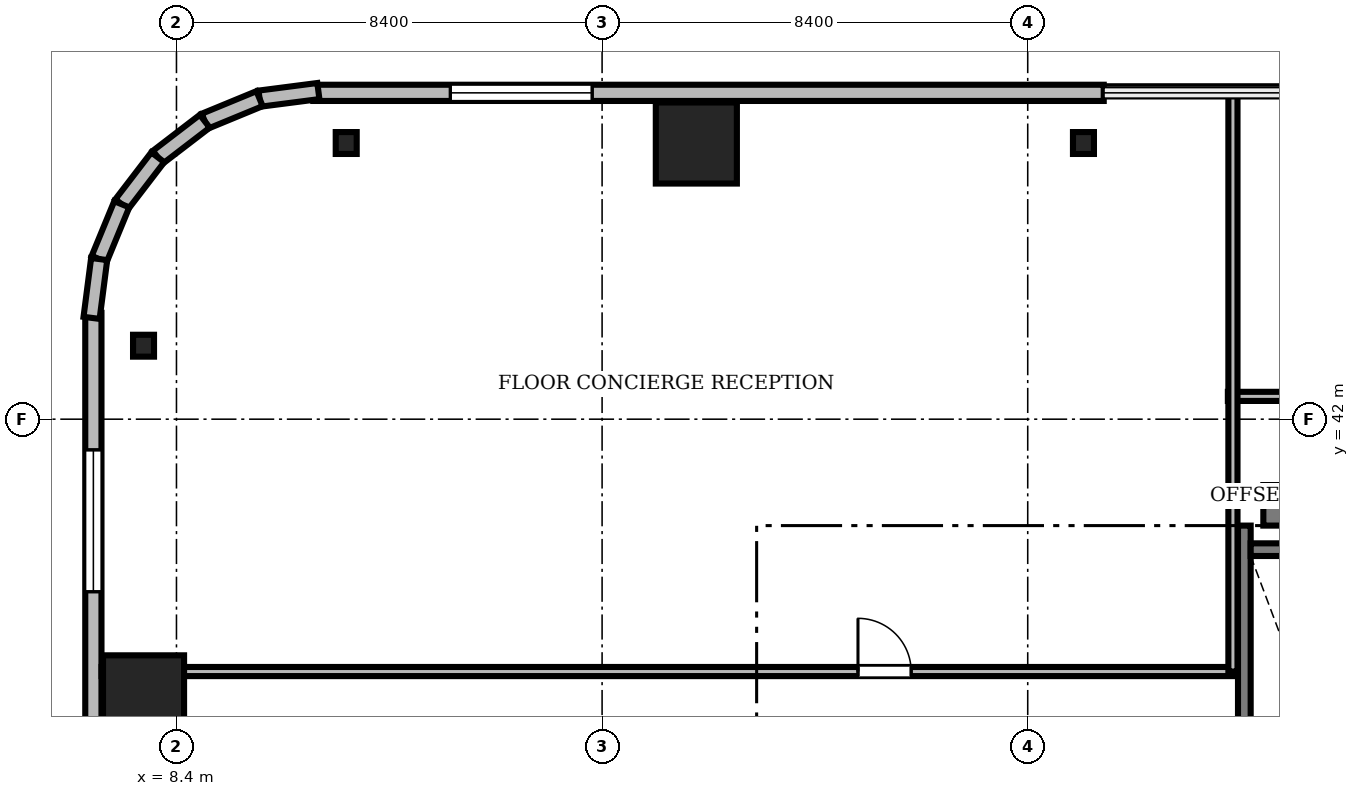
"""IFC4 building model, lengths in metres.
Left out: names, types, materials, properties, quantities, classifications, styles, units other than length and angle.
Written with IfcOpenShell. Run it as: python <this file> out.ifc"""

import sys

from ifc_helpers import new_model, si_unit, direction, frame, frame_2d, origin, origin_2d, place, context, subcontext, project, spatial, rectangle, i_section, extrude, source, transform, mapped, element, fill, save


model = new_model("IFC4")
c1 = context("Model", 3, precision=1e-05, world=origin(), true_north=direction((0.0, 1.0)))
c2 = subcontext(c1, "Body", "Model", "MODEL_VIEW")
j1 = project(units=[si_unit("LENGTHUNIT", "METRE"), si_unit("PLANEANGLEUNIT", "RADIAN")], contexts=[c1])
p1 = place(None, origin())
s1 = spatial("IfcSite", under=j1, at=p1, CompositionType="ELEMENT")
p2 = place(p1, origin())
s2 = spatial("IfcBuilding", under=s1, at=p2, CompositionType="ELEMENT")
p3 = place(p2, frame((0.0, 0.0, 126.1)))
s3 = spatial("IfcBuildingStorey", under=s2, at=p3, CompositionType="ELEMENT", Elevation=126.1)
m1 = source(origin(), c2, "Body", "SweptSolid", [
    extrude(rectangle(XDim=17.52, YDim=0.8, at=frame_2d((8.76, 0.0))), origin(), (0.0, 0.0, 1.0), 3.46),
])
p4 = place(p3, frame((29.85, 40.3, 0.0), z_axis=(0.0, 0.0, 1.0), x_axis=(1.0, 0.0, 0.0)))
e1 = element("IfcWall", 1, at=p4, inside=s3, PredefinedType="SHEAR", context=c2, shape_type="MappedRepresentation", body=[
    mapped(m1, transform((0.0, 0.0, 0.0), scale=1.0)),
])
m2 = source(origin(), c2, "Body", "SweptSolid", [
    extrude(rectangle(XDim=1.6, YDim=1.6, at=origin_2d()), origin(), (0.0, 0.0, 1.0), 3.46),
])
for number, where, z_axis, x_axis in (
    (2, (18.66, 47.45, 0.0), (0.0, 0.0, 1.0), (1.0, 0.0, 0.0)),
    (3, (7.75, 36.54, 0.0), (0.0, 0.0, 1.0), (1.0, 0.0, 0.0)),
):
    element("IfcColumn", number, at=place(p3, frame(where, z_axis=z_axis, x_axis=x_axis)), inside=s3, PredefinedType="COLUMN", context=c2, shape_type="MappedRepresentation", body=[
        mapped(m2, transform((0.0, 0.0, 0.0), scale=1.0)),
    ])
m3 = source(origin(), c2, "Body", "SweptSolid", [
    extrude(i_section(OverallWidth=0.414, OverallDepth=0.432, WebThickness=0.026, FlangeThickness=0.04, FilletRadius=0.015, at=origin_2d()), origin(), (0.0, 0.0, 1.0), 3.46),
])
for number, where, z_axis, x_axis in (
    (4, (26.3, 47.45, 0.0), (0.0, 0.0, 1.0), (1.0, 0.0, 0.0)),
    (5, (11.75, 47.45, 0.0), (0.0, 0.0, 1.0), (1.0, 0.0, 0.0)),
    (6, (7.75, 43.45, 0.0), (0.0, 0.0, 1.0), (1.0, 0.0, 0.0)),
):
    element("IfcColumn", number, at=place(p3, frame(where, z_axis=z_axis, x_axis=x_axis)), inside=s3, PredefinedType="COLUMN", context=c2, shape_type="MappedRepresentation", body=[
        mapped(m3, transform((0.0, 0.0, 0.0), scale=1.0)),
    ])
m4 = source(origin(), c2, "Body", "SweptSolid", [
    extrude(rectangle(XDim=15.6, YDim=0.32, at=frame_2d((7.8, 0.0))), origin(), (0.0, 0.0, 1.0), 3.46),
])
p5 = place(p3, frame((26.7, 48.44, 0.0), z_axis=(0.0, 0.0, 1.0), x_axis=(-1.0, 0.0, 0.0)))
e7 = element("IfcWall", 7, at=p5, inside=s3, PredefinedType="SOLIDWALL", context=c2, shape_type="MappedRepresentation", body=[
    mapped(m4, transform((0.0, 0.0, 0.0), scale=1.0)),
])
m5 = source(origin(), c2, "Body", "SweptSolid", [
    extrude(rectangle(XDim=2.8, YDim=2.4, at=frame_2d((1.4, 1.2))), frame((0.0, 0.17, 0.0), z_axis=(0.0, -1.0, 0.0), x_axis=(1.0, 0.0, 0.0)), (0.0, 0.0, 1.0), 0.34),
])
p6 = place(p5, frame((10.095, 0.0, 0.72)))
e8 = element("IfcOpeningElement", 8, at=p6, cuts=e7, PredefinedType="OPENING", context=c2, shape_type="MappedRepresentation", body=[
    mapped(m5, transform((0.0, 0.0, 0.0), scale=1.0)),
])
m6 = source(origin(), c2, "Body", "SweptSolid", [
    extrude(rectangle(XDim=15.6, YDim=0.32, at=frame_2d((7.8, 0.0))), origin(), (0.0, 0.0, 1.0), 3.46),
])
p7 = place(p3, frame((6.76, 44.1, 0.0), z_axis=(0.0, 0.0, 1.0), x_axis=(0.0, -1.0, 0.0)))
e9 = element("IfcWall", 9, at=p7, inside=s3, PredefinedType="SOLIDWALL", context=c2, shape_type="MappedRepresentation", body=[
    mapped(m6, transform((0.0, 0.0, 0.0), scale=1.0)),
])
m7 = source(origin(), c2, "Body", "SweptSolid", [
    extrude(rectangle(XDim=1.4, YDim=2.3, at=frame_2d((0.7, 1.15))), frame((0.0, 0.17, 0.0), z_axis=(0.0, -1.0, 0.0), x_axis=(1.0, 0.0, 0.0)), (0.0, 0.0, 1.0), 0.34),
])
p8 = place(p7, frame((9.61, 0.0, 0.0)))
e10 = element("IfcOpeningElement", 10, at=p8, cuts=e9, PredefinedType="OPENING", context=c2, shape_type="MappedRepresentation", body=[
    mapped(m7, transform((0.0, 0.0, 0.0), scale=1.0)),
])
p9 = place(p7, frame((2.705, 0.0, 0.72)))
e11 = element("IfcOpeningElement", 11, at=p9, cuts=e9, PredefinedType="OPENING", context=c2, shape_type="MappedRepresentation", body=[
    mapped(m5, transform((0.0, 0.0, 0.0), scale=1.0)),
])
m8 = source(origin(), c2, "Body", "SweptSolid", [
    extrude(rectangle(XDim=1.17, YDim=0.32, at=frame_2d((0.585, 0.0))), origin(), (0.0, 0.0, 1.0), 3.46),
])
p10 = place(p3, frame((11.2, 48.476, 0.0), z_axis=(0.0, 0.0, 1.0), x_axis=(-0.991735963317, -0.128295670475, 0.0)))
e12 = element("IfcWall", 12, at=p10, inside=s3, PredefinedType="SOLIDWALL", context=c2, shape_type="MappedRepresentation", body=[
    mapped(m8, transform((0.0, 0.0, 0.0), scale=1.0)),
])
m9 = source(origin(), c2, "Body", "SweptSolid", [
    extrude(rectangle(XDim=1.169, YDim=0.32, at=frame_2d((0.584, 0.0))), origin(), (0.0, 0.0, 1.0), 3.46),
])
p11 = place(p3, frame((10.04, 48.325, 0.0), z_axis=(0.0, 0.0, 1.0), x_axis=(-0.924552646638, -0.381054331552, 0.0)))
e13 = element("IfcWall", 13, at=p11, inside=s3, PredefinedType="SOLIDWALL", context=c2, shape_type="MappedRepresentation", body=[
    mapped(m9, transform((0.0, 0.0, 0.0), scale=1.0)),
])
m10 = source(origin(), c2, "Body", "SweptSolid", [
    extrude(rectangle(XDim=1.169, YDim=0.32, at=frame_2d((0.584, 0.0))), origin(), (0.0, 0.0, 1.0), 3.46),
])
p12 = place(p3, frame((8.959, 47.88, 0.0), z_axis=(0.0, 0.0, 1.0), x_axis=(-0.793663520347, -0.608356981114, 0.0)))
e14 = element("IfcWall", 14, at=p12, inside=s3, PredefinedType="SOLIDWALL", context=c2, shape_type="MappedRepresentation", body=[
    mapped(m10, transform((0.0, 0.0, 0.0), scale=1.0)),
])
m11 = source(origin(), c2, "Body", "SweptSolid", [
    extrude(rectangle(XDim=1.169, YDim=0.32, at=frame_2d((0.584, 0.0))), origin(), (0.0, 0.0, 1.0), 3.46),
])
p13 = place(p3, frame((8.031, 47.169, 0.0), z_axis=(0.0, 0.0, 1.0), x_axis=(-0.608387696831, -0.793639975269, 0.0)))
e15 = element("IfcWall", 15, at=p13, inside=s3, PredefinedType="SOLIDWALL", context=c2, shape_type="MappedRepresentation", body=[
    mapped(m11, transform((0.0, 0.0, 0.0), scale=1.0)),
])
p14 = place(p3, frame((7.32, 46.241, 0.0), z_axis=(0.0, 0.0, 1.0), x_axis=(-0.381054331552, -0.924552646638, 0.0)))
e16 = element("IfcWall", 16, at=p14, inside=s3, PredefinedType="SOLIDWALL", context=c2, shape_type="MappedRepresentation", body=[
    mapped(m9, transform((0.0, 0.0, 0.0), scale=1.0)),
])
p15 = place(p3, frame((6.875, 45.16, 0.0), z_axis=(0.0, 0.0, 1.0), x_axis=(-0.128295670475, -0.991735963317, 0.0)))
e17 = element("IfcWall", 17, at=p15, inside=s3, PredefinedType="SOLIDWALL", context=c2, shape_type="MappedRepresentation", body=[
    mapped(m8, transform((0.0, 0.0, 0.0), scale=1.0)),
])
m12 = source(origin(), c2, "Body", "SweptSolid", [
    extrude(rectangle(XDim=9.25, YDim=0.25, at=frame_2d((4.625, 0.0))), origin(), (0.0, 0.0, 1.0), 3.5),
])
p16 = place(p3, frame((29.475, 30.65, 0.0), z_axis=(0.0, 0.0, 1.0), x_axis=(0.0, 1.0, 0.0)))
e18 = element("IfcWall", 18, at=p16, inside=s3, PredefinedType="SOLIDWALL", context=c2, shape_type="MappedRepresentation", body=[
    mapped(m12, transform((0.0, 0.0, 0.0), scale=1.0)),
])
m13 = source(origin(), c2, "Body", "SweptSolid", [
    extrude(rectangle(XDim=3.15, YDim=0.25, at=frame_2d((1.575, 0.0))), origin(), (0.0, 0.0, 1.0), 3.5),
])
p17 = place(p3, frame((29.6, 39.425, 0.0), z_axis=(0.0, 0.0, 1.0), x_axis=(1.0, 0.0, 0.0)))
e19 = element("IfcWall", 19, at=p17, inside=s3, PredefinedType="SOLIDWALL", context=c2, shape_type="MappedRepresentation", body=[
    mapped(m13, transform((0.0, 0.0, 0.0), scale=1.0)),
])
m14 = source(origin(), c2, "Body", "SweptSolid", [
    extrude(rectangle(XDim=23.928, YDim=0.18, at=frame_2d((11.964, 0.0))), origin(), (0.0, 0.0, 1.0), 2.702),
])
p18 = place(p3, frame((29.15, 42.45, 0.0), z_axis=(0.0, 0.0, 1.0), x_axis=(1.0, 0.0, 0.0)))
e20 = element("IfcWall", 20, at=p18, inside=s3, PredefinedType="PARTITIONING", context=c2, shape_type="MappedRepresentation", body=[
    mapped(m14, transform((0.0, 0.0, 0.0), scale=1.0)),
])
m15 = source(origin(), c2, "Body", "SweptSolid", [
    extrude(rectangle(XDim=1.05, YDim=2.2, at=frame_2d((0.525, 1.1))), frame((0.0, 0.1, 0.0), z_axis=(0.0, -1.0, 0.0), x_axis=(1.0, 0.0, 0.0)), (0.0, 0.0, 1.0), 0.2),
])
p19 = place(p18, frame((4.5, 0.0, 0.0)))
e21 = element("IfcOpeningElement", 21, at=p19, cuts=e20, PredefinedType="OPENING", context=c2, shape_type="MappedRepresentation", body=[
    mapped(m15, transform((0.0, 0.0, 0.0), scale=1.0)),
])
m16 = source(origin(), c2, "Body", "SweptSolid", [
    extrude(rectangle(XDim=22.328, YDim=0.18, at=frame_2d((11.164, 0.0))), origin(), (0.0, 0.0, 1.0), 2.702),
])
p20 = place(p3, frame((6.922, 37.02, 0.0), z_axis=(0.0, 0.0, 1.0), x_axis=(1.0, 0.0, 0.0)))
e22 = element("IfcWall", 22, at=p20, inside=s3, PredefinedType="PARTITIONING", context=c2, shape_type="MappedRepresentation", body=[
    mapped(m16, transform((0.0, 0.0, 0.0), scale=1.0)),
])
p21 = place(p20, frame((14.928, 0.0, 0.0)))
e23 = element("IfcOpeningElement", 23, at=p21, cuts=e22, PredefinedType="OPENING", context=c2, shape_type="MappedRepresentation", body=[
    mapped(m15, transform((0.0, 0.0, 0.0), scale=1.0)),
])
m17 = source(origin(), c2, "Body", "SweptSolid", [
    extrude(rectangle(XDim=11.45, YDim=0.18, at=frame_2d((5.725, 0.0))), origin(), (0.0, 0.0, 1.0), 2.702),
])
p22 = place(p3, frame((29.25, 37.02, 0.0), z_axis=(0.0, 0.0, 1.0), x_axis=(0.0, 1.0, 0.0)))
e24 = element("IfcWall", 24, at=p22, inside=s3, PredefinedType="PARTITIONING", context=c2, shape_type="MappedRepresentation", body=[
    mapped(m17, transform((0.0, 0.0, 0.0), scale=1.0)),
])
m18 = source(origin(), c2, "Body", "SweptSolid", [
    extrude(rectangle(XDim=2.8, YDim=2.4, at=frame_2d((1.4, 1.2))), frame((0.0, 0.03, 0.0), z_axis=(0.0, -1.0, 0.0), x_axis=(1.0, 0.0, 0.0)), (0.0, 0.0, 1.0), 0.06),
])
p23 = place(p6, origin())
e25 = element("IfcWindow", 25, at=p23, inside=s3, PartitioningType="SINGLE_PANEL", PredefinedType="WINDOW", context=c2, shape_type="MappedRepresentation", body=[
    mapped(m18, transform((0.0, 0.0, 0.0), scale=1.0)),
])
fill(e8, e25)
p24 = place(p9, origin())
e26 = element("IfcWindow", 26, at=p24, inside=s3, PartitioningType="SINGLE_PANEL", PredefinedType="WINDOW", context=c2, shape_type="MappedRepresentation", body=[
    mapped(m18, transform((0.0, 0.0, 0.0), scale=1.0)),
])
fill(e11, e26)
m19 = source(origin(), c2, "Body", "SweptSolid", [
    extrude(rectangle(XDim=1.05, YDim=2.2, at=frame_2d((0.525, 1.1))), frame((0.0, 0.025, 0.0), z_axis=(0.0, -1.0, 0.0), x_axis=(1.0, 0.0, 0.0)), (0.0, 0.0, 1.0), 0.05),
])
p25 = place(p21, origin())
e27 = element("IfcDoor", 27, at=p25, inside=s3, OperationType="SINGLE_SWING_LEFT", PredefinedType="DOOR", context=c2, shape_type="MappedRepresentation", body=[
    mapped(m19, transform((0.0, 0.0, 0.0), scale=1.0)),
])
fill(e23, e27)
save(model, sys.argv[1])
